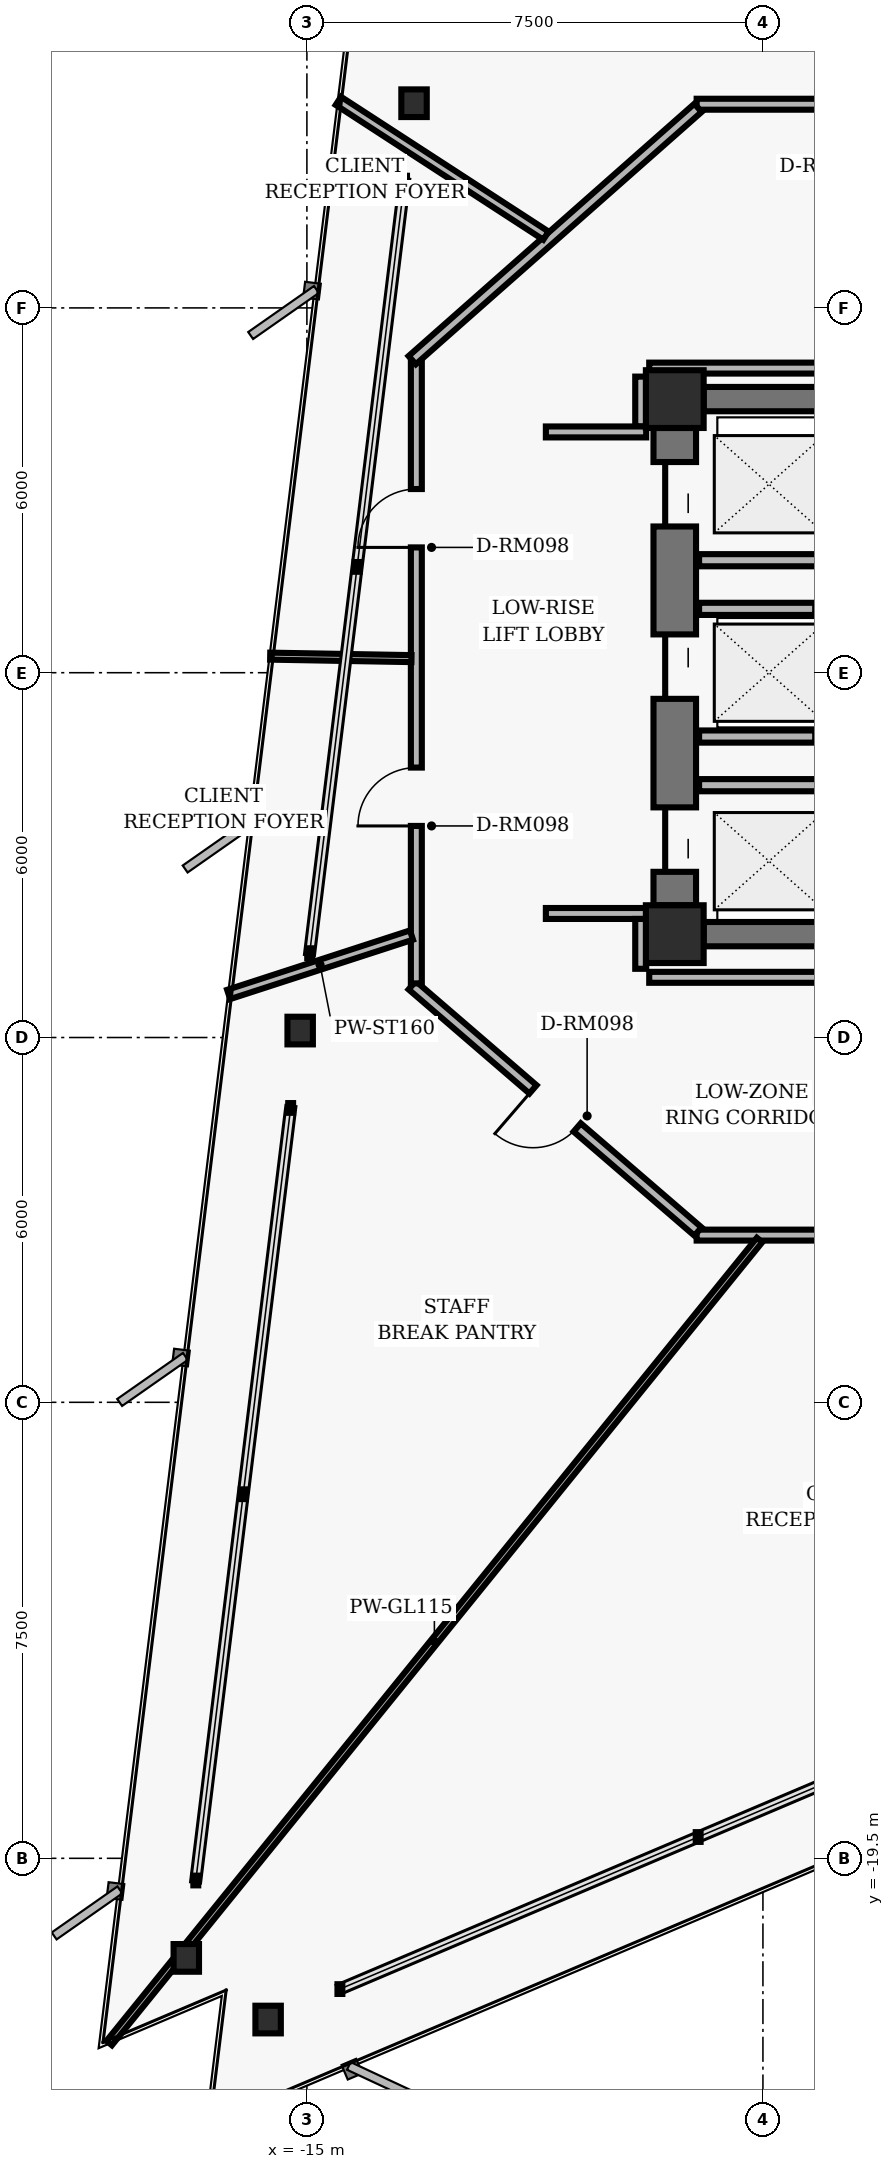
"""IFC4 building model, lengths in metres.
Left out: names, types, materials, properties, quantities, classifications, styles, units other than length and angle.
Written with IfcOpenShell. Run it as: python <this file> out.ifc"""

import sys

from ifc_helpers import new_model, si_unit, direction, frame, frame_2d, origin, origin_2d, place, context, subcontext, project, spatial, rectangle, hollow_rectangle, i_section, extrude, element, fill, save


model = new_model("IFC4")
c1 = context("Model", 3, precision=1e-05, world=origin(), true_north=direction((0.0, 1.0)))
c2 = subcontext(c1, "Body", "Model", "MODEL_VIEW")
j1 = project(units=[si_unit("LENGTHUNIT", "METRE"), si_unit("PLANEANGLEUNIT", "RADIAN")], contexts=[c1])
p1 = place(None, origin())
s1 = spatial("IfcSite", under=j1, at=p1, CompositionType="ELEMENT")
p2 = place(p1, origin())
s2 = spatial("IfcBuilding", under=s1, at=p2, CompositionType="ELEMENT")
p3 = place(p2, frame((0.0, 0.0, 66.4)))
s3 = spatial("IfcBuildingStorey", under=s2, at=p3, CompositionType="ELEMENT", Elevation=66.4)
for number, where, z_axis, x_axis in (
    (1, (-8.95, 4.5, 0.0), (0.0, 0.0, 1.0), (1.0, 0.0, 0.0)),
    (2, (-8.95, -4.3, 0.0), (0.0, 0.0, 1.0), (1.0, 0.0, 0.0)),
):
    element("IfcColumn", number, at=place(p3, frame(where, z_axis=z_axis, x_axis=x_axis)), inside=s3, PredefinedType="COLUMN", context=c2, shape_type="SweptSolid", body=[
        extrude(hollow_rectangle(XDim=0.95, YDim=0.95, WallThickness=0.06, InnerFilletRadius=0.02, OuterFilletRadius=0.04, at=origin_2d()), origin(), (0.0, 0.0, 1.0), 3.36),
    ])
p4 = place(p3, frame((-8.95, -3.825, 0.0), z_axis=(0.0, 0.0, 1.0), x_axis=(0.0, 1.0, 0.0)))
e3 = element("IfcWall", 3, at=p4, inside=s3, PredefinedType="SHEAR", context=c2, shape_type="SweptSolid", body=[
    extrude(rectangle(XDim=7.85, YDim=0.7, at=frame_2d((3.925, 0.0))), origin(), (0.0, 0.0, 1.0), 3.098),
])
p5 = place(p4, frame((0.55, 0.0, 0.0)))
e4 = element("IfcOpeningElement", 4, at=p5, cuts=e3, PredefinedType="OPENING", context=c2, shape_type="SweptSolid", body=[
    extrude(rectangle(XDim=1.06, YDim=2.04, at=frame_2d((0.53, 1.02))), frame((0.0, 0.36, 0.0), z_axis=(0.0, -1.0, 0.0), x_axis=(1.0, 0.0, 0.0)), (0.0, 0.0, 1.0), 0.72),
])
p6 = place(p4, frame((3.395, 0.0, 0.0)))
e5 = element("IfcOpeningElement", 5, at=p6, cuts=e3, PredefinedType="OPENING", context=c2, shape_type="SweptSolid", body=[
    extrude(rectangle(XDim=1.06, YDim=2.04, at=frame_2d((0.53, 1.02))), frame((0.0, 0.36, 0.0), z_axis=(0.0, -1.0, 0.0), x_axis=(1.0, 0.0, 0.0)), (0.0, 0.0, 1.0), 0.72),
])
p7 = place(p4, frame((6.23, 0.0, 0.0)))
e6 = element("IfcOpeningElement", 6, at=p7, cuts=e3, PredefinedType="OPENING", context=c2, shape_type="SweptSolid", body=[
    extrude(rectangle(XDim=1.06, YDim=2.04, at=frame_2d((0.53, 1.02))), frame((0.0, 0.36, 0.0), z_axis=(0.0, -1.0, 0.0), x_axis=(1.0, 0.0, 0.0)), (0.0, 0.0, 1.0), 0.72),
])
for number, where, z_axis, x_axis in (
    (7, (-8.475, 4.5, 0.0), (0.0, 0.0, 1.0), (1.0, 0.0, 0.0)),
    (8, (-8.475, -4.3, 0.0), (0.0, 0.0, 1.0), (1.0, 0.0, 0.0)),
):
    element("IfcWall", number, at=place(p3, frame(where, z_axis=z_axis, x_axis=x_axis)), inside=s3, PredefinedType="SHEAR", context=c2, shape_type="SweptSolid", body=[
        extrude(rectangle(XDim=1.95, YDim=0.4, at=frame_2d((0.975, 0.0))), origin(), (0.0, 0.0, 1.0), 3.098),
    ])
for number, where, z_axis, x_axis in (
    (9, (-13.238, 9.366, 0.0), (0.0, 0.0, 1.0), (1.0, 0.0, 0.0)),
    (10, (-15.111, -5.886, 0.0), (0.0, 0.0, 1.0), (1.0, 0.0, 0.0)),
    (11, (-16.983, -21.138, 0.0), (0.0, 0.0, 1.0), (1.0, 0.0, 0.0)),
    (12, (-15.638, -22.152, 0.0), (0.0, 0.0, 1.0), (1.0, 0.0, 0.0)),
):
    element("IfcColumn", number, at=place(p3, frame(where, z_axis=z_axis, x_axis=x_axis)), inside=s3, PredefinedType="COLUMN", context=c2, shape_type="SweptSolid", body=[
        extrude(i_section(OverallWidth=0.418, OverallDepth=0.455, WebThickness=0.042, FlangeThickness=0.068, FilletRadius=0.025, at=origin_2d()), origin(), (0.0, 0.0, 1.0), 3.36),
    ])
for number, where, z_axis, x_axis in (
    (13, (-8.55, -1.85, 0.0), (0.0, 0.0, 1.0), (1.0, 0.0, 0.0)),
    (14, (-8.55, 1.85, 0.0), (0.0, 0.0, 1.0), (1.0, 0.0, 0.0)),
):
    element("IfcWall", number, at=place(p3, frame(where, z_axis=z_axis, x_axis=x_axis)), inside=s3, PredefinedType="PARTITIONING", context=c2, shape_type="SweptSolid", body=[
        extrude(rectangle(XDim=2.1, YDim=0.2, at=frame_2d((1.05, 0.0))), origin(), (0.0, 0.0, 1.0), 3.073),
    ])
for number, where, z_axis, x_axis in (
    (15, (-8.55, -1.05, 0.0), (0.0, 0.0, 1.0), (1.0, 0.0, 0.0)),
    (16, (-8.55, 1.05, 0.0), (0.0, 0.0, 1.0), (1.0, 0.0, 0.0)),
):
    element("IfcWall", number, at=place(p3, frame(where, z_axis=z_axis, x_axis=x_axis)), inside=s3, PredefinedType="PARTITIONING", context=c2, shape_type="SweptSolid", body=[
        extrude(rectangle(XDim=1.91, YDim=0.2, at=frame_2d((0.955, 0.0))), origin(), (0.0, 0.0, 1.0), 3.073),
    ])
p8 = place(p3, frame((-8.59, 9.35, 0.0), z_axis=(0.0, 0.0, 1.0), x_axis=(1.0, 0.0, 0.0)))
e17 = element("IfcWall", 17, at=p8, inside=s3, PredefinedType="PARTITIONING", context=c2, shape_type="SweptSolid", body=[
    extrude(rectangle(XDim=17.18, YDim=0.18, at=frame_2d((8.59, 0.0))), origin(), (0.0, 0.0, 1.0), 3.073),
])
p9 = place(p8, frame((13.54, 0.0, 0.0)))
e18 = element("IfcOpeningElement", 18, at=p9, cuts=e17, PredefinedType="OPENING", context=c2, shape_type="SweptSolid", body=[
    extrude(rectangle(XDim=0.96, YDim=2.02, at=frame_2d((0.48, 1.01))), frame((0.0, 0.1, 0.0), z_axis=(0.0, -1.0, 0.0), x_axis=(1.0, 0.0, 0.0)), (0.0, 0.0, 1.0), 0.2),
])
p10 = place(p8, frame((7.453, 0.0, 0.0)))
e19 = element("IfcOpeningElement", 19, at=p10, cuts=e17, PredefinedType="OPENING", context=c2, shape_type="SweptSolid", body=[
    extrude(rectangle(XDim=1.18, YDim=2.02, at=frame_2d((0.59, 1.01))), frame((0.0, 0.1, 0.0), z_axis=(0.0, -1.0, 0.0), x_axis=(1.0, 0.0, 0.0)), (0.0, 0.0, 1.0), 0.2),
])
p11 = place(p8, frame((2.133, 0.0, 0.0)))
e20 = element("IfcOpeningElement", 20, at=p11, cuts=e17, PredefinedType="OPENING", context=c2, shape_type="SweptSolid", body=[
    extrude(rectangle(XDim=0.96, YDim=2.02, at=frame_2d((0.48, 1.01))), frame((0.0, 0.1, 0.0), z_axis=(0.0, -1.0, 0.0), x_axis=(1.0, 0.0, 0.0)), (0.0, 0.0, 1.0), 0.2),
])
p12 = place(p3, frame((8.41, -9.25, 0.0), z_axis=(0.0, 0.0, 1.0), x_axis=(-1.0, 0.0, 0.0)))
e21 = element("IfcWall", 21, at=p12, inside=s3, PredefinedType="PARTITIONING", context=c2, shape_type="SweptSolid", body=[
    extrude(rectangle(XDim=17.0, YDim=0.18, at=frame_2d((8.5, 0.0))), origin(), (0.0, 0.0, 1.0), 2.587),
])
p13 = place(p12, frame((12.127, 0.0, 0.0)))
e22 = element("IfcOpeningElement", 22, at=p13, cuts=e21, PredefinedType="OPENING", context=c2, shape_type="SweptSolid", body=[
    extrude(rectangle(XDim=0.96, YDim=2.02, at=frame_2d((0.48, 1.01))), frame((0.0, 0.1, 0.0), z_axis=(0.0, -1.0, 0.0), x_axis=(1.0, 0.0, 0.0)), (0.0, 0.0, 1.0), 0.2),
])
p14 = place(p12, frame((5.75, 0.0, 0.0)))
e23 = element("IfcOpeningElement", 23, at=p14, cuts=e21, PredefinedType="OPENING", context=c2, shape_type="SweptSolid", body=[
    extrude(rectangle(XDim=0.96, YDim=2.02, at=frame_2d((0.48, 1.01))), frame((0.0, 0.1, 0.0), z_axis=(0.0, -1.0, 0.0), x_axis=(1.0, 0.0, 0.0)), (0.0, 0.0, 1.0), 0.2),
])
p15 = place(p3, frame((-8.568, -9.191, 0.0), z_axis=(0.0, 0.0, 1.0), x_axis=(-0.757556899173, 0.652769135694, 0.0)))
e24 = element("IfcWall", 24, at=p15, inside=s3, PredefinedType="PARTITIONING", context=c2, shape_type="SweptSolid", body=[
    extrude(rectangle(XDim=6.204, YDim=0.18, at=frame_2d((3.102, 0.0))), origin(), (0.0, 0.0, 1.0), 3.073),
])
p16 = place(p15, frame((2.622, 0.0, 0.0)))
e25 = element("IfcOpeningElement", 25, at=p16, cuts=e24, PredefinedType="OPENING", context=c2, shape_type="SweptSolid", body=[
    extrude(rectangle(XDim=0.96, YDim=2.02, at=frame_2d((0.48, 1.01))), frame((0.0, 0.1, 0.0), z_axis=(0.0, -1.0, 0.0), x_axis=(1.0, 0.0, 0.0)), (0.0, 0.0, 1.0), 0.2),
])
p17 = place(p3, frame((-13.2, -5.11, 0.0), z_axis=(0.0, 0.0, 1.0), x_axis=(0.0, 1.0, 0.0)))
e26 = element("IfcWall", 26, at=p17, inside=s3, PredefinedType="PARTITIONING", context=c2, shape_type="SweptSolid", body=[
    extrude(rectangle(XDim=10.22, YDim=0.18, at=frame_2d((5.11, 0.0))), origin(), (0.0, 0.0, 1.0), 2.587),
])
p18 = place(p17, frame((2.59, 0.0, 0.0)))
e27 = element("IfcOpeningElement", 27, at=p18, cuts=e26, PredefinedType="OPENING", context=c2, shape_type="SweptSolid", body=[
    extrude(rectangle(XDim=0.96, YDim=2.02, at=frame_2d((0.48, 1.01))), frame((0.0, 0.1, 0.0), z_axis=(0.0, -1.0, 0.0), x_axis=(1.0, 0.0, 0.0)), (0.0, 0.0, 1.0), 0.2),
])
p19 = place(p17, frame((7.171, 0.0, 0.0)))
e28 = element("IfcOpeningElement", 28, at=p19, cuts=e26, PredefinedType="OPENING", context=c2, shape_type="SweptSolid", body=[
    extrude(rectangle(XDim=0.96, YDim=2.02, at=frame_2d((0.48, 1.01))), frame((0.0, 0.1, 0.0), z_axis=(0.0, -1.0, 0.0), x_axis=(1.0, 0.0, 0.0)), (0.0, 0.0, 1.0), 0.2),
])
p20 = place(p3, frame((-13.268, 5.14, 0.0), z_axis=(0.0, 0.0, 1.0), x_axis=(0.749626463267, 0.66186113768, 0.0)))
e29 = element("IfcWall", 29, at=p20, inside=s3, PredefinedType="PARTITIONING", context=c2, shape_type="SweptSolid", body=[
    extrude(rectangle(XDim=6.27, YDim=0.18, at=frame_2d((3.135, 0.0))), origin(), (0.0, 0.0, 1.0), 3.073),
])
p21 = place(p3, frame((-9.51, 4.87, 0.0), z_axis=(0.0, 0.0, 1.0), x_axis=(0.0, -1.0, 0.0)))
e30 = element("IfcWall", 30, at=p21, inside=s3, PredefinedType="PARTITIONING", context=c2, shape_type="SweptSolid", body=[
    extrude(rectangle(XDim=0.82, YDim=0.18, at=frame_2d((0.41, 0.0))), origin(), (0.0, 0.0, 1.0), 3.073),
])
for number, where, z_axis, x_axis in (
    (31, (-9.42, 3.96, 0.0), (0.0, 0.0, 1.0), (-1.0, 0.0, 0.0)),
    (32, (-11.07, -3.96, 0.0), (0.0, 0.0, 1.0), (1.0, 0.0, 0.0)),
):
    element("IfcWall", number, at=place(p3, frame(where, z_axis=z_axis, x_axis=x_axis)), inside=s3, PredefinedType="PARTITIONING", context=c2, shape_type="SweptSolid", body=[
        extrude(rectangle(XDim=1.65, YDim=0.18, at=frame_2d((0.825, 0.0))), origin(), (0.0, 0.0, 1.0), 3.073),
    ])
p22 = place(p3, frame((-9.51, -4.05, 0.0), z_axis=(0.0, 0.0, 1.0), x_axis=(0.0, -1.0, 0.0)))
e33 = element("IfcWall", 33, at=p22, inside=s3, PredefinedType="PARTITIONING", context=c2, shape_type="SweptSolid", body=[
    extrude(rectangle(XDim=0.82, YDim=0.18, at=frame_2d((0.41, 0.0))), origin(), (0.0, 0.0, 1.0), 3.073),
])
p23 = place(p3, frame((-9.37, -5.01, 0.0), z_axis=(0.0, 0.0, 1.0), x_axis=(1.0, 0.0, 0.0)))
e34 = element("IfcWall", 34, at=p23, inside=s3, PredefinedType="PARTITIONING", context=c2, shape_type="SweptSolid", body=[
    extrude(rectangle(XDim=3.34, YDim=0.18, at=frame_2d((1.67, 0.0))), origin(), (0.0, 0.0, 1.0), 3.073),
])
p24 = place(p3, frame((-6.562, 5.01, 0.0), z_axis=(0.0, 0.0, 1.0), x_axis=(-1.0, 0.0, 0.0)))
e35 = element("IfcWall", 35, at=p24, inside=s3, PredefinedType="PARTITIONING", context=c2, shape_type="SweptSolid", body=[
    extrude(rectangle(XDim=2.808, YDim=0.18, at=frame_2d((1.404, 0.0))), origin(), (0.0, 0.0, 1.0), 3.073),
])
p25 = place(p3, frame((-13.28, -4.315, 0.0), z_axis=(0.0, 0.0, 1.0), x_axis=(-0.951057330934, -0.309014487164, 0.0)))
e36 = element("IfcWall", 36, at=p25, inside=s3, PredefinedType="PARTITIONING", context=c2, shape_type="SweptSolid", body=[
    extrude(rectangle(XDim=3.162, YDim=0.16, at=frame_2d((1.581, 0.0))), origin(), (0.0, 0.0, 1.0), 3.073),
])
p26 = place(p3, frame((-7.555, -9.33, 0.0), z_axis=(0.0, 0.0, 1.0), x_axis=(-0.629320948329, -0.777145510181, 0.0)))
e37 = element("IfcWall", 37, at=p26, inside=s3, PredefinedType="MOVABLE", context=c2, shape_type="SweptSolid", body=[
    extrude(rectangle(XDim=16.996, YDim=0.115, at=frame_2d((8.498, 0.0))), origin(), (0.0, 0.0, 1.0), 2.358),
])
p27 = place(p3, frame((-3.62, 9.43, 0.0), z_axis=(0.0, 0.0, 1.0), x_axis=(-0.358366182081, 0.933581104961, 0.0)))
e38 = element("IfcWall", 38, at=p27, inside=s3, PredefinedType="PARTITIONING", context=c2, shape_type="SweptSolid", body=[
    extrude(rectangle(XDim=18.901, YDim=0.24, at=frame_2d((9.45, 0.0))), origin(), (0.0, 0.0, 1.0), 3.073),
])
p28 = place(p3, frame((-11.069, 7.188, 0.0), z_axis=(0.0, 0.0, 1.0), x_axis=(-0.838653238926, 0.544665718436, 0.0)))
e39 = element("IfcWall", 39, at=p28, inside=s3, PredefinedType="PARTITIONING", context=c2, shape_type="SweptSolid", body=[
    extrude(rectangle(XDim=4.07, YDim=0.16, at=frame_2d((2.035, 0.0))), origin(), (0.0, 0.0, 1.0), 2.358),
])
p29 = place(p3, frame((-13.28, 0.232, 0.0), z_axis=(0.0, 0.0, 1.0), x_axis=(-0.999846109686, 0.017543002765, 0.0)))
e40 = element("IfcWall", 40, at=p29, inside=s3, PredefinedType="MOVABLE", context=c2, shape_type="SweptSolid", body=[
    extrude(rectangle(XDim=2.324, YDim=0.115, at=frame_2d((1.162, 0.0))), origin(), (0.0, 0.0, 1.0), 3.073),
])
p30 = place(p5, origin())
e41 = element("IfcDoor", 41, at=p30, inside=s3, OperationType="SLIDING_TO_LEFT", PredefinedType="DOOR", context=c2, shape_type="SweptSolid", body=[
    extrude(rectangle(XDim=1.06, YDim=2.04, at=frame_2d((0.53, 1.02))), frame((0.0, 0.025, 0.0), z_axis=(0.0, -1.0, 0.0), x_axis=(1.0, 0.0, 0.0)), (0.0, 0.0, 1.0), 0.05),
])
fill(e4, e41)
p31 = place(p6, origin())
e42 = element("IfcDoor", 42, at=p31, inside=s3, OperationType="SLIDING_TO_RIGHT", PredefinedType="DOOR", context=c2, shape_type="SweptSolid", body=[
    extrude(rectangle(XDim=1.06, YDim=2.04, at=frame_2d((0.53, 1.02))), frame((0.0, 0.025, 0.0), z_axis=(0.0, -1.0, 0.0), x_axis=(1.0, 0.0, 0.0)), (0.0, 0.0, 1.0), 0.05),
])
fill(e5, e42)
p32 = place(p7, origin())
e43 = element("IfcDoor", 43, at=p32, inside=s3, OperationType="SLIDING_TO_LEFT", PredefinedType="DOOR", context=c2, shape_type="SweptSolid", body=[
    extrude(rectangle(XDim=1.06, YDim=2.04, at=frame_2d((0.53, 1.02))), frame((0.0, 0.025, 0.0), z_axis=(0.0, -1.0, 0.0), x_axis=(1.0, 0.0, 0.0)), (0.0, 0.0, 1.0), 0.05),
])
fill(e6, e43)
p33 = place(p18, origin())
e44 = element("IfcDoor", 44, at=p33, inside=s3, OperationType="SINGLE_SWING_LEFT", PredefinedType="DOOR", context=c2, shape_type="SweptSolid", body=[
    extrude(rectangle(XDim=0.96, YDim=2.02, at=frame_2d((0.48, 1.01))), frame((0.0, 0.025, 0.0), z_axis=(0.0, -1.0, 0.0), x_axis=(1.0, 0.0, 0.0)), (0.0, 0.0, 1.0), 0.05),
])
fill(e27, e44)
p34 = place(p16, origin())
e45 = element("IfcDoor", 45, at=p34, inside=s3, OperationType="SINGLE_SWING_RIGHT", PredefinedType="DOOR", context=c2, shape_type="SweptSolid", body=[
    extrude(rectangle(XDim=0.96, YDim=2.02, at=frame_2d((0.48, 1.01))), frame((0.0, 0.025, 0.0), z_axis=(0.0, -1.0, 0.0), x_axis=(1.0, 0.0, 0.0)), (0.0, 0.0, 1.0), 0.05),
])
fill(e25, e45)
p35 = place(p19, origin())
e46 = element("IfcDoor", 46, at=p35, inside=s3, OperationType="SINGLE_SWING_LEFT", PredefinedType="DOOR", context=c2, shape_type="SweptSolid", body=[
    extrude(rectangle(XDim=0.96, YDim=2.02, at=frame_2d((0.48, 1.01))), frame((0.0, 0.025, 0.0), z_axis=(0.0, -1.0, 0.0), x_axis=(1.0, 0.0, 0.0)), (0.0, 0.0, 1.0), 0.05),
])
fill(e28, e46)
save(model, sys.argv[1])
